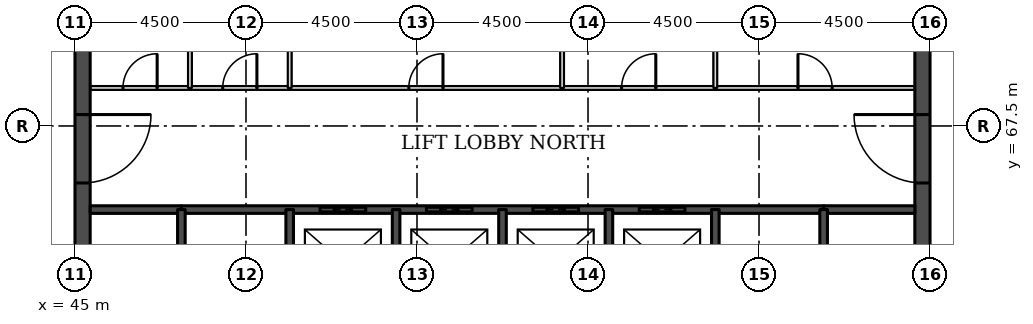
"""IFC4 building model, lengths in metres.
Left out: names, types, materials, properties, quantities, classifications, styles, units other than length and angle.
Written with IfcOpenShell. Run it as: python <this file> out.ifc"""

import sys

from ifc_helpers import new_model, si_unit, direction, frame, frame_2d, origin, place, context, subcontext, project, spatial, rectangle, extrude, element, fill, save


model = new_model("IFC4")
c1 = context("Model", 3, precision=1e-05, world=origin(), true_north=direction((0.0, 1.0)))
c2 = subcontext(c1, "Body", "Model", "MODEL_VIEW")
j1 = project(units=[si_unit("LENGTHUNIT", "METRE"), si_unit("PLANEANGLEUNIT", "RADIAN")], contexts=[c1])
p1 = place(None, origin())
s1 = spatial("IfcSite", under=j1, at=p1, CompositionType="ELEMENT")
p2 = place(p1, origin())
s2 = spatial("IfcBuilding", under=s1, at=p2, CompositionType="ELEMENT")
p3 = place(p2, frame((0.0, 0.0, 192.1)))
s3 = spatial("IfcBuildingStorey", under=s2, at=p3, CompositionType="ELEMENT", Elevation=192.1)
p4 = place(p3, frame((45.2, 49.5, 0.0), z_axis=(0.0, 0.0, 1.0), x_axis=(0.0, 1.0, 0.0)))
e1 = element("IfcWall", 1, at=p4, inside=s3, PredefinedType="SHEAR", context=c2, shape_type="SweptSolid", body=[
    extrude(rectangle(XDim=22.5, YDim=0.4, at=frame_2d((11.25, 0.0))), origin(), (0.0, 0.0, 1.0), 3.7),
])
p5 = place(p4, frame((4.2, 0.0, 0.0)))
e2 = element("IfcOpeningElement", 2, at=p5, cuts=e1, PredefinedType="OPENING", context=c2, shape_type="SweptSolid", body=[
    extrude(rectangle(XDim=1.8, YDim=2.1, at=frame_2d((0.9, 1.05))), frame((0.0, 0.21, 0.0), z_axis=(0.0, -1.0, 0.0), x_axis=(1.0, 0.0, 0.0)), (0.0, 0.0, 1.0), 0.42),
])
p6 = place(p4, frame((6.9, 0.0, 0.0)))
e3 = element("IfcOpeningElement", 3, at=p6, cuts=e1, PredefinedType="OPENING", context=c2, shape_type="SweptSolid", body=[
    extrude(rectangle(XDim=1.1, YDim=2.1, at=frame_2d((0.55, 1.05))), frame((0.0, 0.21, 0.0), z_axis=(0.0, -1.0, 0.0), x_axis=(1.0, 0.0, 0.0)), (0.0, 0.0, 1.0), 0.42),
])
p7 = place(p4, frame((13.6, 0.0, 0.0)))
e4 = element("IfcOpeningElement", 4, at=p7, cuts=e1, PredefinedType="OPENING", context=c2, shape_type="SweptSolid", body=[
    extrude(rectangle(XDim=1.1, YDim=2.1, at=frame_2d((0.55, 1.05))), frame((0.0, 0.21, 0.0), z_axis=(0.0, -1.0, 0.0), x_axis=(1.0, 0.0, 0.0)), (0.0, 0.0, 1.0), 0.42),
])
p8 = place(p4, frame((16.5, 0.0, 0.0)))
e5 = element("IfcOpeningElement", 5, at=p8, cuts=e1, PredefinedType="OPENING", context=c2, shape_type="SweptSolid", body=[
    extrude(rectangle(XDim=1.8, YDim=2.1, at=frame_2d((0.9, 1.05))), frame((0.0, 0.21, 0.0), z_axis=(0.0, -1.0, 0.0), x_axis=(1.0, 0.0, 0.0)), (0.0, 0.0, 1.0), 0.42),
])
p9 = place(p3, frame((67.3, 49.5, 0.0), z_axis=(0.0, 0.0, 1.0), x_axis=(0.0, 1.0, 0.0)))
e6 = element("IfcWall", 6, at=p9, inside=s3, PredefinedType="SHEAR", context=c2, shape_type="SweptSolid", body=[
    extrude(rectangle(XDim=22.5, YDim=0.4, at=frame_2d((11.25, 0.0))), origin(), (0.0, 0.0, 1.0), 3.7),
])
p10 = place(p9, frame((4.2, 0.0, 0.0)))
e7 = element("IfcOpeningElement", 7, at=p10, cuts=e6, PredefinedType="OPENING", context=c2, shape_type="SweptSolid", body=[
    extrude(rectangle(XDim=1.8, YDim=2.1, at=frame_2d((0.9, 1.05))), frame((0.0, 0.21, 0.0), z_axis=(0.0, -1.0, 0.0), x_axis=(1.0, 0.0, 0.0)), (0.0, 0.0, 1.0), 0.42),
])
p11 = place(p9, frame((6.9, 0.0, 0.0)))
e8 = element("IfcOpeningElement", 8, at=p11, cuts=e6, PredefinedType="OPENING", context=c2, shape_type="SweptSolid", body=[
    extrude(rectangle(XDim=1.1, YDim=2.1, at=frame_2d((0.55, 1.05))), frame((0.0, 0.21, 0.0), z_axis=(0.0, -1.0, 0.0), x_axis=(1.0, 0.0, 0.0)), (0.0, 0.0, 1.0), 0.42),
])
p12 = place(p9, frame((13.6, 0.0, 0.0)))
e9 = element("IfcOpeningElement", 9, at=p12, cuts=e6, PredefinedType="OPENING", context=c2, shape_type="SweptSolid", body=[
    extrude(rectangle(XDim=1.1, YDim=2.1, at=frame_2d((0.55, 1.05))), frame((0.0, 0.21, 0.0), z_axis=(0.0, -1.0, 0.0), x_axis=(1.0, 0.0, 0.0)), (0.0, 0.0, 1.0), 0.42),
])
p13 = place(p9, frame((16.5, 0.0, 0.0)))
e10 = element("IfcOpeningElement", 10, at=p13, cuts=e6, PredefinedType="OPENING", context=c2, shape_type="SweptSolid", body=[
    extrude(rectangle(XDim=1.8, YDim=2.1, at=frame_2d((0.9, 1.05))), frame((0.0, 0.21, 0.0), z_axis=(0.0, -1.0, 0.0), x_axis=(1.0, 0.0, 0.0)), (0.0, 0.0, 1.0), 0.42),
])
for number, where, z_axis, x_axis in (
    (11, (45.4, 65.3, 0.0), (0.0, 0.0, 1.0), (1.0, 0.0, 0.0)),
    (12, (64.7, 65.3, 0.0), (0.0, 0.0, 1.0), (1.0, 0.0, 0.0)),
):
    element("IfcWall", number, at=place(p3, frame(where, z_axis=z_axis, x_axis=x_axis)), inside=s3, PredefinedType="SOLIDWALL", context=c2, shape_type="SweptSolid", body=[
        extrude(rectangle(XDim=2.4, YDim=0.2, at=frame_2d((1.2, 0.0))), origin(), (0.0, 0.0, 1.0), 3.55),
    ])
p14 = place(p3, frame((47.8, 65.3, 0.0), z_axis=(0.0, 0.0, 1.0), x_axis=(1.0, 0.0, 0.0)))
e13 = element("IfcWall", 13, at=p14, inside=s3, PredefinedType="SOLIDWALL", context=c2, shape_type="SweptSolid", body=[
    extrude(rectangle(XDim=16.9, YDim=0.2, at=frame_2d((8.45, 0.0))), origin(), (0.0, 0.0, 1.0), 3.55),
])
p15 = place(p14, frame((3.65, 0.0, 0.0)))
e14 = element("IfcOpeningElement", 14, at=p15, cuts=e13, PredefinedType="OPENING", context=c2, shape_type="SweptSolid", body=[
    extrude(rectangle(XDim=1.2, YDim=2.1, at=frame_2d((0.6, 1.05))), frame((0.0, 0.11, 0.0), z_axis=(0.0, -1.0, 0.0), x_axis=(1.0, 0.0, 0.0)), (0.0, 0.0, 1.0), 0.22),
])
p16 = place(p14, frame((6.45, 0.0, 0.0)))
e15 = element("IfcOpeningElement", 15, at=p16, cuts=e13, PredefinedType="OPENING", context=c2, shape_type="SweptSolid", body=[
    extrude(rectangle(XDim=1.2, YDim=2.1, at=frame_2d((0.6, 1.05))), frame((0.0, 0.11, 0.0), z_axis=(0.0, -1.0, 0.0), x_axis=(1.0, 0.0, 0.0)), (0.0, 0.0, 1.0), 0.22),
])
p17 = place(p14, frame((9.25, 0.0, 0.0)))
e16 = element("IfcOpeningElement", 16, at=p17, cuts=e13, PredefinedType="OPENING", context=c2, shape_type="SweptSolid", body=[
    extrude(rectangle(XDim=1.2, YDim=2.1, at=frame_2d((0.6, 1.05))), frame((0.0, 0.11, 0.0), z_axis=(0.0, -1.0, 0.0), x_axis=(1.0, 0.0, 0.0)), (0.0, 0.0, 1.0), 0.22),
])
p18 = place(p14, frame((12.05, 0.0, 0.0)))
e17 = element("IfcOpeningElement", 17, at=p18, cuts=e13, PredefinedType="OPENING", context=c2, shape_type="SweptSolid", body=[
    extrude(rectangle(XDim=1.2, YDim=2.1, at=frame_2d((0.6, 1.05))), frame((0.0, 0.11, 0.0), z_axis=(0.0, -1.0, 0.0), x_axis=(1.0, 0.0, 0.0)), (0.0, 0.0, 1.0), 0.22),
])
p19 = place(p3, frame((45.4, 68.5, 0.0), z_axis=(0.0, 0.0, 1.0), x_axis=(1.0, 0.0, 0.0)))
e18 = element("IfcWall", 18, at=p19, inside=s3, PredefinedType="PARTITIONING", context=c2, shape_type="SweptSolid", body=[
    extrude(rectangle(XDim=21.7, YDim=0.1, at=frame_2d((10.85, 0.0))), origin(), (0.0, 0.0, 1.0), 3.55),
])
p20 = place(p19, frame((18.625, 0.0, 0.0)))
e19 = element("IfcOpeningElement", 19, at=p20, cuts=e18, PredefinedType="OPENING", context=c2, shape_type="SweptSolid", body=[
    extrude(rectangle(XDim=0.9, YDim=2.1, at=frame_2d((0.45, 1.05))), frame((0.0, 0.06, 0.0), z_axis=(0.0, -1.0, 0.0), x_axis=(1.0, 0.0, 0.0)), (0.0, 0.0, 1.0), 0.12),
])
p21 = place(p19, frame((0.863, 0.0, 0.0)))
e20 = element("IfcOpeningElement", 20, at=p21, cuts=e18, PredefinedType="OPENING", context=c2, shape_type="SweptSolid", body=[
    extrude(rectangle(XDim=0.9, YDim=2.1, at=frame_2d((0.45, 1.05))), frame((0.0, 0.06, 0.0), z_axis=(0.0, -1.0, 0.0), x_axis=(1.0, 0.0, 0.0)), (0.0, 0.0, 1.0), 0.12),
])
p22 = place(p19, frame((3.488, 0.0, 0.0)))
e21 = element("IfcOpeningElement", 21, at=p22, cuts=e18, PredefinedType="OPENING", context=c2, shape_type="SweptSolid", body=[
    extrude(rectangle(XDim=0.9, YDim=2.1, at=frame_2d((0.45, 1.05))), frame((0.0, 0.06, 0.0), z_axis=(0.0, -1.0, 0.0), x_axis=(1.0, 0.0, 0.0)), (0.0, 0.0, 1.0), 0.12),
])
p23 = place(p19, frame((13.984, 0.0, 0.0)))
e22 = element("IfcOpeningElement", 22, at=p23, cuts=e18, PredefinedType="OPENING", context=c2, shape_type="SweptSolid", body=[
    extrude(rectangle(XDim=0.9, YDim=2.1, at=frame_2d((0.45, 1.05))), frame((0.0, 0.06, 0.0), z_axis=(0.0, -1.0, 0.0), x_axis=(1.0, 0.0, 0.0)), (0.0, 0.0, 1.0), 0.12),
])
p24 = place(p19, frame((8.384, 0.0, 0.0)))
e23 = element("IfcOpeningElement", 23, at=p24, cuts=e18, PredefinedType="OPENING", context=c2, shape_type="SweptSolid", body=[
    extrude(rectangle(XDim=0.9, YDim=2.1, at=frame_2d((0.45, 1.05))), frame((0.0, 0.06, 0.0), z_axis=(0.0, -1.0, 0.0), x_axis=(1.0, 0.0, 0.0)), (0.0, 0.0, 1.0), 0.12),
])
p25 = place(p3, frame((47.8, 62.0, 0.0), z_axis=(0.0, 0.0, 1.0), x_axis=(0.0, 1.0, 0.0)))
e24 = element("IfcWall", 24, at=p25, inside=s3, PredefinedType="SOLIDWALL", context=c2, shape_type="SweptSolid", body=[
    extrude(rectangle(XDim=3.3, YDim=0.2, at=frame_2d((1.65, 0.0))), origin(), (0.0, 0.0, 1.0), 3.55),
])
p26 = place(p25, frame((1.1, 0.0, 0.0)))
e25 = element("IfcOpeningElement", 25, at=p26, cuts=e24, PredefinedType="OPENING", context=c2, shape_type="SweptSolid", body=[
    extrude(rectangle(XDim=1.1, YDim=2.1, at=frame_2d((0.55, 1.05))), frame((0.0, 0.11, 0.0), z_axis=(0.0, -1.0, 0.0), x_axis=(1.0, 0.0, 0.0)), (0.0, 0.0, 1.0), 0.22),
])
for number, where, z_axis, x_axis in (
    (26, (48.025, 68.5, 0.0), (0.0, 0.0, 1.0), (0.0, 1.0, 0.0)),
    (27, (50.65, 68.5, 0.0), (0.0, 0.0, 1.0), (0.0, 1.0, 0.0)),
):
    element("IfcWall", number, at=place(p3, frame(where, z_axis=z_axis, x_axis=x_axis)), inside=s3, PredefinedType="PARTITIONING", context=c2, shape_type="SweptSolid", body=[
        extrude(rectangle(XDim=3.1, YDim=0.1, at=frame_2d((1.55, 0.0))), origin(), (0.0, 0.0, 1.0), 3.55),
    ])
p27 = place(p3, frame((50.65, 62.0, 0.0), z_axis=(0.0, 0.0, 1.0), x_axis=(0.0, 1.0, 0.0)))
e28 = element("IfcWall", 28, at=p27, inside=s3, PredefinedType="SOLIDWALL", context=c2, shape_type="SweptSolid", body=[
    extrude(rectangle(XDim=3.3, YDim=0.2, at=frame_2d((1.65, 0.0))), origin(), (0.0, 0.0, 1.0), 3.55),
])
for number, where, z_axis, x_axis in (
    (29, (53.45, 62.5, 0.0), (0.0, 0.0, 1.0), (0.0, 1.0, 0.0)),
    (30, (56.25, 62.5, 0.0), (0.0, 0.0, 1.0), (0.0, 1.0, 0.0)),
):
    element("IfcWall", number, at=place(p3, frame(where, z_axis=z_axis, x_axis=x_axis)), inside=s3, PredefinedType="SOLIDWALL", context=c2, shape_type="SweptSolid", body=[
        extrude(rectangle(XDim=2.8, YDim=0.2, at=frame_2d((1.4, 0.0))), origin(), (0.0, 0.0, 1.0), 3.55),
    ])
p28 = place(p3, frame((57.818, 68.5, 0.0), z_axis=(0.0, 0.0, 1.0), x_axis=(0.0, 1.0, 0.0)))
e31 = element("IfcWall", 31, at=p28, inside=s3, PredefinedType="PARTITIONING", context=c2, shape_type="SweptSolid", body=[
    extrude(rectangle(XDim=3.1, YDim=0.1, at=frame_2d((1.55, 0.0))), origin(), (0.0, 0.0, 1.0), 3.55),
])
p29 = place(p3, frame((59.05, 62.5, 0.0), z_axis=(0.0, 0.0, 1.0), x_axis=(0.0, 1.0, 0.0)))
e32 = element("IfcWall", 32, at=p29, inside=s3, PredefinedType="SOLIDWALL", context=c2, shape_type="SweptSolid", body=[
    extrude(rectangle(XDim=2.8, YDim=0.2, at=frame_2d((1.4, 0.0))), origin(), (0.0, 0.0, 1.0), 3.55),
])
p30 = place(p3, frame((61.85, 68.5, 0.0), z_axis=(0.0, 0.0, 1.0), x_axis=(0.0, 1.0, 0.0)))
e33 = element("IfcWall", 33, at=p30, inside=s3, PredefinedType="PARTITIONING", context=c2, shape_type="SweptSolid", body=[
    extrude(rectangle(XDim=3.1, YDim=0.1, at=frame_2d((1.55, 0.0))), origin(), (0.0, 0.0, 1.0), 3.55),
])
p31 = place(p3, frame((61.85, 62.0, 0.0), z_axis=(0.0, 0.0, 1.0), x_axis=(0.0, 1.0, 0.0)))
e34 = element("IfcWall", 34, at=p31, inside=s3, PredefinedType="SOLIDWALL", context=c2, shape_type="SweptSolid", body=[
    extrude(rectangle(XDim=3.3, YDim=0.2, at=frame_2d((1.65, 0.0))), origin(), (0.0, 0.0, 1.0), 3.55),
])
p32 = place(p3, frame((64.7, 62.0, 0.0), z_axis=(0.0, 0.0, 1.0), x_axis=(0.0, 1.0, 0.0)))
e35 = element("IfcWall", 35, at=p32, inside=s3, PredefinedType="SOLIDWALL", context=c2, shape_type="SweptSolid", body=[
    extrude(rectangle(XDim=3.3, YDim=0.2, at=frame_2d((1.65, 0.0))), origin(), (0.0, 0.0, 1.0), 3.55),
])
p33 = place(p32, frame((1.1, 0.0, 0.0)))
e36 = element("IfcOpeningElement", 36, at=p33, cuts=e35, PredefinedType="OPENING", context=c2, shape_type="SweptSolid", body=[
    extrude(rectangle(XDim=1.1, YDim=2.1, at=frame_2d((0.55, 1.05))), frame((0.0, 0.11, 0.0), z_axis=(0.0, -1.0, 0.0), x_axis=(1.0, 0.0, 0.0)), (0.0, 0.0, 1.0), 0.22),
])
p34 = place(p15, origin())
e37 = element("IfcDoor", 37, at=p34, inside=s3, OperationType="DOUBLE_DOOR_SLIDING", PredefinedType="DOOR", context=c2, shape_type="SweptSolid", body=[
    extrude(rectangle(XDim=1.2, YDim=2.1, at=frame_2d((0.6, 1.05))), frame((0.0, 0.025, 0.0), z_axis=(0.0, -1.0, 0.0), x_axis=(1.0, 0.0, 0.0)), (0.0, 0.0, 1.0), 0.05),
])
fill(e14, e37)
p35 = place(p16, origin())
e38 = element("IfcDoor", 38, at=p35, inside=s3, OperationType="DOUBLE_DOOR_SLIDING", PredefinedType="DOOR", context=c2, shape_type="SweptSolid", body=[
    extrude(rectangle(XDim=1.2, YDim=2.1, at=frame_2d((0.6, 1.05))), frame((0.0, 0.025, 0.0), z_axis=(0.0, -1.0, 0.0), x_axis=(1.0, 0.0, 0.0)), (0.0, 0.0, 1.0), 0.05),
])
fill(e15, e38)
p36 = place(p17, origin())
e39 = element("IfcDoor", 39, at=p36, inside=s3, OperationType="DOUBLE_DOOR_SLIDING", PredefinedType="DOOR", context=c2, shape_type="SweptSolid", body=[
    extrude(rectangle(XDim=1.2, YDim=2.1, at=frame_2d((0.6, 1.05))), frame((0.0, 0.025, 0.0), z_axis=(0.0, -1.0, 0.0), x_axis=(1.0, 0.0, 0.0)), (0.0, 0.0, 1.0), 0.05),
])
fill(e16, e39)
p37 = place(p18, origin())
e40 = element("IfcDoor", 40, at=p37, inside=s3, OperationType="DOUBLE_DOOR_SLIDING", PredefinedType="DOOR", context=c2, shape_type="SweptSolid", body=[
    extrude(rectangle(XDim=1.2, YDim=2.1, at=frame_2d((0.6, 1.05))), frame((0.0, 0.025, 0.0), z_axis=(0.0, -1.0, 0.0), x_axis=(1.0, 0.0, 0.0)), (0.0, 0.0, 1.0), 0.05),
])
fill(e17, e40)
p38 = place(p8, frame((1.8, 0.0, 0.0), z_axis=(0.0, 0.0, 1.0), x_axis=(-1.0, 0.0, 0.0)))
e41 = element("IfcDoor", 41, at=p38, inside=s3, OperationType="SINGLE_SWING_LEFT", PredefinedType="DOOR", context=c2, shape_type="SweptSolid", body=[
    extrude(rectangle(XDim=1.8, YDim=2.1, at=frame_2d((0.9, 1.05))), frame((0.0, 0.025, 0.0), z_axis=(0.0, -1.0, 0.0), x_axis=(1.0, 0.0, 0.0)), (0.0, 0.0, 1.0), 0.05),
])
fill(e5, e41)
p39 = place(p13, origin())
e42 = element("IfcDoor", 42, at=p39, inside=s3, OperationType="SINGLE_SWING_RIGHT", PredefinedType="DOOR", context=c2, shape_type="SweptSolid", body=[
    extrude(rectangle(XDim=1.8, YDim=2.1, at=frame_2d((0.9, 1.05))), frame((0.0, 0.025, 0.0), z_axis=(0.0, -1.0, 0.0), x_axis=(1.0, 0.0, 0.0)), (0.0, 0.0, 1.0), 0.05),
])
fill(e10, e42)
p40 = place(p20, origin())
e43 = element("IfcDoor", 43, at=p40, inside=s3, OperationType="SINGLE_SWING_LEFT", PredefinedType="DOOR", context=c2, shape_type="SweptSolid", body=[
    extrude(rectangle(XDim=0.9, YDim=2.1, at=frame_2d((0.45, 1.05))), frame((0.0, 0.025, 0.0), z_axis=(0.0, -1.0, 0.0), x_axis=(1.0, 0.0, 0.0)), (0.0, 0.0, 1.0), 0.05),
])
fill(e19, e43)
p41 = place(p21, origin())
e44 = element("IfcDoor", 44, at=p41, inside=s3, OperationType="SINGLE_SWING_RIGHT", PredefinedType="DOOR", context=c2, shape_type="SweptSolid", body=[
    extrude(rectangle(XDim=0.9, YDim=2.1, at=frame_2d((0.45, 1.05))), frame((0.0, 0.025, 0.0), z_axis=(0.0, -1.0, 0.0), x_axis=(1.0, 0.0, 0.0)), (0.0, 0.0, 1.0), 0.05),
])
fill(e20, e44)
p42 = place(p22, origin())
e45 = element("IfcDoor", 45, at=p42, inside=s3, OperationType="SINGLE_SWING_RIGHT", PredefinedType="DOOR", context=c2, shape_type="SweptSolid", body=[
    extrude(rectangle(XDim=0.9, YDim=2.1, at=frame_2d((0.45, 1.05))), frame((0.0, 0.025, 0.0), z_axis=(0.0, -1.0, 0.0), x_axis=(1.0, 0.0, 0.0)), (0.0, 0.0, 1.0), 0.05),
])
fill(e21, e45)
p43 = place(p23, origin())
e46 = element("IfcDoor", 46, at=p43, inside=s3, OperationType="SINGLE_SWING_RIGHT", PredefinedType="DOOR", context=c2, shape_type="SweptSolid", body=[
    extrude(rectangle(XDim=0.9, YDim=2.1, at=frame_2d((0.45, 1.05))), frame((0.0, 0.025, 0.0), z_axis=(0.0, -1.0, 0.0), x_axis=(1.0, 0.0, 0.0)), (0.0, 0.0, 1.0), 0.05),
])
fill(e22, e46)
p44 = place(p24, origin())
e47 = element("IfcDoor", 47, at=p44, inside=s3, OperationType="SINGLE_SWING_RIGHT", PredefinedType="DOOR", context=c2, shape_type="SweptSolid", body=[
    extrude(rectangle(XDim=0.9, YDim=2.1, at=frame_2d((0.45, 1.05))), frame((0.0, 0.025, 0.0), z_axis=(0.0, -1.0, 0.0), x_axis=(1.0, 0.0, 0.0)), (0.0, 0.0, 1.0), 0.05),
])
fill(e23, e47)
save(model, sys.argv[1])
